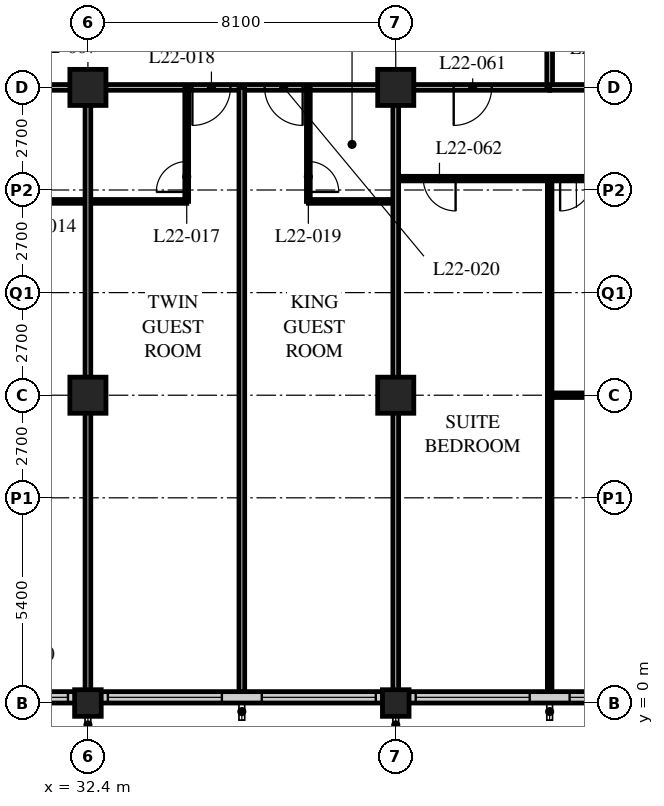
"""IFC4 building model, lengths in metres.
Left out: names, types, materials, properties, quantities, classifications, styles, units other than length and angle.
Written with IfcOpenShell. Run it as: python <this file> out.ifc"""

import sys

from ifc_helpers import new_model, si_unit, direction, frame, frame_2d, origin, origin_2d, place, context, subcontext, project, spatial, rectangle, hollow_rectangle, extrude, element, fill, save


model = new_model("IFC4")
c1 = context("Model", 3, precision=1e-05, world=origin(), true_north=direction((0.0, 1.0)))
c2 = subcontext(c1, "Body", "Model", "MODEL_VIEW")
j1 = project(units=[si_unit("LENGTHUNIT", "METRE"), si_unit("PLANEANGLEUNIT", "RADIAN")], contexts=[c1])
p1 = place(None, origin())
s1 = spatial("IfcSite", under=j1, at=p1, CompositionType="ELEMENT")
p2 = place(p1, origin())
s2 = spatial("IfcBuilding", under=s1, at=p2, CompositionType="ELEMENT")
p3 = place(p2, frame((0.0, 0.0, 87.4)))
s3 = spatial("IfcBuildingStorey", under=s2, at=p3, CompositionType="ELEMENT", Elevation=87.4)
p4 = place(p3, frame((32.4, 0.0, 0.0), z_axis=(0.0, 0.0, 1.0), x_axis=(1.0, 0.0, 0.0)))
e1 = element("IfcColumn", 1, at=p4, inside=s3, PredefinedType="COLUMN", context=c2, shape_type="SweptSolid", body=[
    extrude(hollow_rectangle(XDim=0.7, YDim=0.7, WallThickness=0.06, at=origin_2d()), origin(), (0.0, 0.0, 1.0), 3.4),
])
for number, where, z_axis, x_axis in (
    (2, (32.4, 8.1, 0.0), (0.0, 0.0, 1.0), (1.0, 0.0, 0.0)),
    (3, (32.4, 16.2, 0.0), (0.0, 0.0, 1.0), (1.0, 0.0, 0.0)),
):
    element("IfcColumn", number, at=place(p3, frame(where, z_axis=z_axis, x_axis=x_axis)), inside=s3, PredefinedType="COLUMN", context=c2, shape_type="SweptSolid", body=[
        extrude(hollow_rectangle(XDim=0.95, YDim=0.95, WallThickness=0.095, at=origin_2d()), origin(), (0.0, 0.0, 1.0), 3.4),
    ])
p5 = place(p3, frame((40.5, 0.0, 0.0), z_axis=(0.0, 0.0, 1.0), x_axis=(1.0, 0.0, 0.0)))
e4 = element("IfcColumn", 4, at=p5, inside=s3, PredefinedType="COLUMN", context=c2, shape_type="SweptSolid", body=[
    extrude(hollow_rectangle(XDim=0.7, YDim=0.7, WallThickness=0.06, at=origin_2d()), origin(), (0.0, 0.0, 1.0), 3.4),
])
for number, where, z_axis, x_axis in (
    (5, (40.5, 8.1, 0.0), (0.0, 0.0, 1.0), (1.0, 0.0, 0.0)),
    (6, (40.5, 16.2, 0.0), (0.0, 0.0, 1.0), (1.0, 0.0, 0.0)),
):
    element("IfcColumn", number, at=place(p3, frame(where, z_axis=z_axis, x_axis=x_axis)), inside=s3, PredefinedType="COLUMN", context=c2, shape_type="SweptSolid", body=[
        extrude(hollow_rectangle(XDim=0.95, YDim=0.95, WallThickness=0.095, at=origin_2d()), origin(), (0.0, 0.0, 1.0), 3.4),
    ])
p6 = place(p3, frame((8.4, 0.15, 0.0), z_axis=(0.0, 0.0, 1.0), x_axis=(1.0, 0.0, 0.0)))
e7 = element("IfcWall", 7, at=p6, inside=s3, PredefinedType="SOLIDWALL", context=c2, shape_type="SweptSolid", body=[
    extrude(rectangle(XDim=40.2, YDim=0.3, at=frame_2d((20.1, 0.0))), origin(), (0.0, 0.0, 1.0), 2.05),
])
p7 = place(p6, frame((0.225, 0.0, 0.9)))
e8 = element("IfcOpeningElement", 8, at=p7, cuts=e7, PredefinedType="OPENING", context=c2, shape_type="SweptSolid", body=[
    extrude(rectangle(XDim=3.0, YDim=1.1, at=frame_2d((1.5, 0.55))), frame((0.0, 0.16, 0.0), z_axis=(0.0, -1.0, 0.0), x_axis=(1.0, 0.0, 0.0)), (0.0, 0.0, 1.0), 0.32),
])
p8 = place(p6, frame((4.275, 0.0, 0.9)))
e9 = element("IfcOpeningElement", 9, at=p8, cuts=e7, PredefinedType="OPENING", context=c2, shape_type="SweptSolid", body=[
    extrude(rectangle(XDim=3.0, YDim=1.1, at=frame_2d((1.5, 0.55))), frame((0.0, 0.16, 0.0), z_axis=(0.0, -1.0, 0.0), x_axis=(1.0, 0.0, 0.0)), (0.0, 0.0, 1.0), 0.32),
])
p9 = place(p6, frame((8.325, 0.0, 0.9)))
e10 = element("IfcOpeningElement", 10, at=p9, cuts=e7, PredefinedType="OPENING", context=c2, shape_type="SweptSolid", body=[
    extrude(rectangle(XDim=3.0, YDim=1.1, at=frame_2d((1.5, 0.55))), frame((0.0, 0.16, 0.0), z_axis=(0.0, -1.0, 0.0), x_axis=(1.0, 0.0, 0.0)), (0.0, 0.0, 1.0), 0.32),
])
p10 = place(p6, frame((12.375, 0.0, 0.9)))
e11 = element("IfcOpeningElement", 11, at=p10, cuts=e7, PredefinedType="OPENING", context=c2, shape_type="SweptSolid", body=[
    extrude(rectangle(XDim=3.0, YDim=1.1, at=frame_2d((1.5, 0.55))), frame((0.0, 0.16, 0.0), z_axis=(0.0, -1.0, 0.0), x_axis=(1.0, 0.0, 0.0)), (0.0, 0.0, 1.0), 0.32),
])
p11 = place(p6, frame((16.425, 0.0, 0.9)))
e12 = element("IfcOpeningElement", 12, at=p11, cuts=e7, PredefinedType="OPENING", context=c2, shape_type="SweptSolid", body=[
    extrude(rectangle(XDim=3.0, YDim=1.1, at=frame_2d((1.5, 0.55))), frame((0.0, 0.16, 0.0), z_axis=(0.0, -1.0, 0.0), x_axis=(1.0, 0.0, 0.0)), (0.0, 0.0, 1.0), 0.32),
])
p12 = place(p6, frame((20.475, 0.0, 0.9)))
e13 = element("IfcOpeningElement", 13, at=p12, cuts=e7, PredefinedType="OPENING", context=c2, shape_type="SweptSolid", body=[
    extrude(rectangle(XDim=3.0, YDim=1.1, at=frame_2d((1.5, 0.55))), frame((0.0, 0.16, 0.0), z_axis=(0.0, -1.0, 0.0), x_axis=(1.0, 0.0, 0.0)), (0.0, 0.0, 1.0), 0.32),
])
p13 = place(p6, frame((24.525, 0.0, 0.9)))
e14 = element("IfcOpeningElement", 14, at=p13, cuts=e7, PredefinedType="OPENING", context=c2, shape_type="SweptSolid", body=[
    extrude(rectangle(XDim=3.0, YDim=1.1, at=frame_2d((1.5, 0.55))), frame((0.0, 0.16, 0.0), z_axis=(0.0, -1.0, 0.0), x_axis=(1.0, 0.0, 0.0)), (0.0, 0.0, 1.0), 0.32),
])
p14 = place(p6, frame((28.575, 0.0, 0.9)))
e15 = element("IfcOpeningElement", 15, at=p14, cuts=e7, PredefinedType="OPENING", context=c2, shape_type="SweptSolid", body=[
    extrude(rectangle(XDim=3.0, YDim=1.1, at=frame_2d((1.5, 0.55))), frame((0.0, 0.16, 0.0), z_axis=(0.0, -1.0, 0.0), x_axis=(1.0, 0.0, 0.0)), (0.0, 0.0, 1.0), 0.32),
])
p15 = place(p6, frame((32.625, 0.0, 0.9)))
e16 = element("IfcOpeningElement", 16, at=p15, cuts=e7, PredefinedType="OPENING", context=c2, shape_type="SweptSolid", body=[
    extrude(rectangle(XDim=3.0, YDim=1.1, at=frame_2d((1.5, 0.55))), frame((0.0, 0.16, 0.0), z_axis=(0.0, -1.0, 0.0), x_axis=(1.0, 0.0, 0.0)), (0.0, 0.0, 1.0), 0.32),
])
p16 = place(p6, frame((36.675, 0.0, 0.9)))
e17 = element("IfcOpeningElement", 17, at=p16, cuts=e7, PredefinedType="OPENING", context=c2, shape_type="SweptSolid", body=[
    extrude(rectangle(XDim=3.0, YDim=1.1, at=frame_2d((1.5, 0.55))), frame((0.0, 0.16, 0.0), z_axis=(0.0, -1.0, 0.0), x_axis=(1.0, 0.0, 0.0)), (0.0, 0.0, 1.0), 0.32),
])
p17 = place(p3, frame((12.15, 16.2, 0.0), z_axis=(0.0, 0.0, 1.0), x_axis=(1.0, 0.0, 0.0)))
e18 = element("IfcWall", 18, at=p17, inside=s3, PredefinedType="PARTITIONING", context=c2, shape_type="SweptSolid", body=[
    extrude(rectangle(XDim=32.4, YDim=0.15, at=frame_2d((16.2, 0.0))), origin(), (0.0, 0.0, 1.0), 2.388),
])
p18 = place(p17, frame((6.5, 0.0, 0.0)))
e19 = element("IfcOpeningElement", 19, at=p18, cuts=e18, PredefinedType="OPENING", context=c2, shape_type="SweptSolid", body=[
    extrude(rectangle(XDim=1.0, YDim=2.1, at=frame_2d((0.5, 1.05))), frame((0.0, 0.085, 0.0), z_axis=(0.0, -1.0, 0.0), x_axis=(1.0, 0.0, 0.0)), (0.0, 0.0, 1.0), 0.17),
])
p19 = place(p17, frame((8.4, 0.0, 0.0)))
e20 = element("IfcOpeningElement", 20, at=p19, cuts=e18, PredefinedType="OPENING", context=c2, shape_type="SweptSolid", body=[
    extrude(rectangle(XDim=1.0, YDim=2.1, at=frame_2d((0.5, 1.05))), frame((0.0, 0.085, 0.0), z_axis=(0.0, -1.0, 0.0), x_axis=(1.0, 0.0, 0.0)), (0.0, 0.0, 1.0), 0.17),
])
p20 = place(p17, frame((14.9, 0.0, 0.0)))
e21 = element("IfcOpeningElement", 21, at=p20, cuts=e18, PredefinedType="OPENING", context=c2, shape_type="SweptSolid", body=[
    extrude(rectangle(XDim=1.0, YDim=2.1, at=frame_2d((0.5, 1.05))), frame((0.0, 0.085, 0.0), z_axis=(0.0, -1.0, 0.0), x_axis=(1.0, 0.0, 0.0)), (0.0, 0.0, 1.0), 0.17),
])
p21 = place(p17, frame((16.5, 0.0, 0.0)))
e22 = element("IfcOpeningElement", 22, at=p21, cuts=e18, PredefinedType="OPENING", context=c2, shape_type="SweptSolid", body=[
    extrude(rectangle(XDim=1.0, YDim=2.1, at=frame_2d((0.5, 1.05))), frame((0.0, 0.085, 0.0), z_axis=(0.0, -1.0, 0.0), x_axis=(1.0, 0.0, 0.0)), (0.0, 0.0, 1.0), 0.17),
])
p22 = place(p17, frame((23.0, 0.0, 0.0)))
e23 = element("IfcOpeningElement", 23, at=p22, cuts=e18, PredefinedType="OPENING", context=c2, shape_type="SweptSolid", body=[
    extrude(rectangle(XDim=1.0, YDim=2.1, at=frame_2d((0.5, 1.05))), frame((0.0, 0.085, 0.0), z_axis=(0.0, -1.0, 0.0), x_axis=(1.0, 0.0, 0.0)), (0.0, 0.0, 1.0), 0.17),
])
p23 = place(p17, frame((24.9, 0.0, 0.0)))
e24 = element("IfcOpeningElement", 24, at=p23, cuts=e18, PredefinedType="OPENING", context=c2, shape_type="SweptSolid", body=[
    extrude(rectangle(XDim=1.0, YDim=2.1, at=frame_2d((0.5, 1.05))), frame((0.0, 0.085, 0.0), z_axis=(0.0, -1.0, 0.0), x_axis=(1.0, 0.0, 0.0)), (0.0, 0.0, 1.0), 0.17),
])
p24 = place(p17, frame((1.525, 0.0, 0.0)))
e25 = element("IfcOpeningElement", 25, at=p24, cuts=e18, PredefinedType="OPENING", context=c2, shape_type="SweptSolid", body=[
    extrude(rectangle(XDim=1.0, YDim=2.1, at=frame_2d((0.5, 1.05))), frame((0.0, 0.085, 0.0), z_axis=(0.0, -1.0, 0.0), x_axis=(1.0, 0.0, 0.0)), (0.0, 0.0, 1.0), 0.17),
])
p25 = place(p17, frame((29.875, 0.0, 0.0)))
e26 = element("IfcOpeningElement", 26, at=p25, cuts=e18, PredefinedType="OPENING", context=c2, shape_type="SweptSolid", body=[
    extrude(rectangle(XDim=1.0, YDim=2.1, at=frame_2d((0.5, 1.05))), frame((0.0, 0.085, 0.0), z_axis=(0.0, -1.0, 0.0), x_axis=(1.0, 0.0, 0.0)), (0.0, 0.0, 1.0), 0.17),
])
p26 = place(p3, frame((44.55, 16.2, 0.0), z_axis=(0.0, 0.0, 1.0), x_axis=(0.0, 1.0, 0.0)))
e27 = element("IfcWall", 27, at=p26, inside=s3, PredefinedType="PARTITIONING", context=c2, shape_type="SweptSolid", body=[
    extrude(rectangle(XDim=26.1, YDim=0.15, at=frame_2d((13.05, 0.0))), origin(), (0.0, 0.0, 1.0), 3.15),
])
p27 = place(p26, frame((2.75, 0.0, 0.0)))
e28 = element("IfcOpeningElement", 28, at=p27, cuts=e27, PredefinedType="OPENING", context=c2, shape_type="SweptSolid", body=[
    extrude(rectangle(XDim=1.0, YDim=2.1, at=frame_2d((0.5, 1.05))), frame((0.0, 0.085, 0.0), z_axis=(0.0, -1.0, 0.0), x_axis=(1.0, 0.0, 0.0)), (0.0, 0.0, 1.0), 0.17),
])
p28 = place(p26, frame((6.5, 0.0, 0.0)))
e29 = element("IfcOpeningElement", 29, at=p28, cuts=e27, PredefinedType="OPENING", context=c2, shape_type="SweptSolid", body=[
    extrude(rectangle(XDim=1.0, YDim=2.1, at=frame_2d((0.5, 1.05))), frame((0.0, 0.085, 0.0), z_axis=(0.0, -1.0, 0.0), x_axis=(1.0, 0.0, 0.0)), (0.0, 0.0, 1.0), 0.17),
])
p29 = place(p26, frame((10.0, 0.0, 0.0)))
e30 = element("IfcOpeningElement", 30, at=p29, cuts=e27, PredefinedType="OPENING", context=c2, shape_type="SweptSolid", body=[
    extrude(rectangle(XDim=1.0, YDim=2.1, at=frame_2d((0.5, 1.05))), frame((0.0, 0.085, 0.0), z_axis=(0.0, -1.0, 0.0), x_axis=(1.0, 0.0, 0.0)), (0.0, 0.0, 1.0), 0.17),
])
p30 = place(p26, frame((18.1, 0.0, 0.0)))
e31 = element("IfcOpeningElement", 31, at=p30, cuts=e27, PredefinedType="OPENING", context=c2, shape_type="SweptSolid", body=[
    extrude(rectangle(XDim=1.0, YDim=2.1, at=frame_2d((0.5, 1.05))), frame((0.0, 0.085, 0.0), z_axis=(0.0, -1.0, 0.0), x_axis=(1.0, 0.0, 0.0)), (0.0, 0.0, 1.0), 0.17),
])
p31 = place(p3, frame((29.8, 13.2, 0.0), z_axis=(0.0, 0.0, 1.0), x_axis=(1.0, 0.0, 0.0)))
e32 = element("IfcWall", 32, at=p31, inside=s3, PredefinedType="PARTITIONING", context=c2, shape_type="SweptSolid", body=[
    extrude(rectangle(XDim=5.2, YDim=0.1, at=frame_2d((2.6, 0.0))), origin(), (0.0, 0.0, 1.0), 3.15),
])
p32 = place(p3, frame((32.4, 16.2, 0.0), z_axis=(0.0, 0.0, 1.0), x_axis=(0.0, -1.0, 0.0)))
e33 = element("IfcWall", 33, at=p32, inside=s3, PredefinedType="PARTITIONING", context=c2, shape_type="SweptSolid", body=[
    extrude(rectangle(XDim=15.9, YDim=0.15, at=frame_2d((7.95, 0.0))), origin(), (0.0, 0.0, 1.0), 2.05),
])
p33 = place(p3, frame((35.0, 16.2, 0.0), z_axis=(0.0, 0.0, 1.0), x_axis=(0.0, -1.0, 0.0)))
e34 = element("IfcWall", 34, at=p33, inside=s3, PredefinedType="PARTITIONING", context=c2, shape_type="SweptSolid", body=[
    extrude(rectangle(XDim=3.0, YDim=0.1, at=frame_2d((1.5, 0.0))), origin(), (0.0, 0.0, 1.0), 3.15),
])
p34 = place(p33, frame((1.95, 0.0, 0.0)))
e35 = element("IfcOpeningElement", 35, at=p34, cuts=e34, PredefinedType="OPENING", context=c2, shape_type="SweptSolid", body=[
    extrude(rectangle(XDim=0.8, YDim=2.1, at=frame_2d((0.4, 1.05))), frame((0.0, 0.06, 0.0), z_axis=(0.0, -1.0, 0.0), x_axis=(1.0, 0.0, 0.0)), (0.0, 0.0, 1.0), 0.12),
])
p35 = place(p3, frame((36.45, 16.2, 0.0), z_axis=(0.0, 0.0, 1.0), x_axis=(0.0, -1.0, 0.0)))
e36 = element("IfcWall", 36, at=p35, inside=s3, PredefinedType="PARTITIONING", context=c2, shape_type="SweptSolid", body=[
    extrude(rectangle(XDim=15.9, YDim=0.15, at=frame_2d((7.95, 0.0))), origin(), (0.0, 0.0, 1.0), 3.15),
])
p36 = place(p3, frame((38.2, 13.2, 0.0), z_axis=(0.0, 0.0, 1.0), x_axis=(1.0, 0.0, 0.0)))
e37 = element("IfcWall", 37, at=p36, inside=s3, PredefinedType="PARTITIONING", context=c2, shape_type="SweptSolid", body=[
    extrude(rectangle(XDim=2.3, YDim=0.1, at=frame_2d((1.15, 0.0))), origin(), (0.0, 0.0, 1.0), 3.15),
])
p37 = place(p3, frame((38.2, 16.2, 0.0), z_axis=(0.0, 0.0, 1.0), x_axis=(0.0, -1.0, 0.0)))
e38 = element("IfcWall", 38, at=p37, inside=s3, PredefinedType="PARTITIONING", context=c2, shape_type="SweptSolid", body=[
    extrude(rectangle(XDim=3.0, YDim=0.1, at=frame_2d((1.5, 0.0))), origin(), (0.0, 0.0, 1.0), 3.15),
])
p38 = place(p37, frame((1.95, 0.0, 0.0)))
e39 = element("IfcOpeningElement", 39, at=p38, cuts=e38, PredefinedType="OPENING", context=c2, shape_type="SweptSolid", body=[
    extrude(rectangle(XDim=0.8, YDim=2.1, at=frame_2d((0.4, 1.05))), frame((0.0, 0.06, 0.0), z_axis=(0.0, -1.0, 0.0), x_axis=(1.0, 0.0, 0.0)), (0.0, 0.0, 1.0), 0.12),
])
p39 = place(p3, frame((40.5, 13.8, 0.0), z_axis=(0.0, 0.0, 1.0), x_axis=(1.0, 0.0, 0.0)))
e40 = element("IfcWall", 40, at=p39, inside=s3, PredefinedType="PARTITIONING", context=c2, shape_type="SweptSolid", body=[
    extrude(rectangle(XDim=8.05, YDim=0.12, at=frame_2d((4.025, 0.0))), origin(), (0.0, 0.0, 1.0), 3.15),
])
p40 = place(p39, frame((0.725, 0.0, 0.0)))
e41 = element("IfcOpeningElement", 41, at=p40, cuts=e40, PredefinedType="OPENING", context=c2, shape_type="SweptSolid", body=[
    extrude(rectangle(XDim=0.85, YDim=2.1, at=frame_2d((0.425, 1.05))), frame((0.0, 0.07, 0.0), z_axis=(0.0, -1.0, 0.0), x_axis=(1.0, 0.0, 0.0)), (0.0, 0.0, 1.0), 0.14),
])
p41 = place(p39, frame((4.325, 0.0, 0.0)))
e42 = element("IfcOpeningElement", 42, at=p41, cuts=e40, PredefinedType="OPENING", context=c2, shape_type="SweptSolid", body=[
    extrude(rectangle(XDim=0.85, YDim=2.1, at=frame_2d((0.425, 1.05))), frame((0.0, 0.07, 0.0), z_axis=(0.0, -1.0, 0.0), x_axis=(1.0, 0.0, 0.0)), (0.0, 0.0, 1.0), 0.14),
])
p42 = place(p3, frame((44.55, 13.8, 0.0), z_axis=(0.0, 0.0, 1.0), x_axis=(0.0, -1.0, 0.0)))
e43 = element("IfcWall", 43, at=p42, inside=s3, PredefinedType="PARTITIONING", context=c2, shape_type="SweptSolid", body=[
    extrude(rectangle(XDim=13.5, YDim=0.12, at=frame_2d((6.75, 0.0))), origin(), (0.0, 0.0, 1.0), 3.15),
])
p43 = place(p3, frame((44.55, 16.2, 0.0), z_axis=(0.0, 0.0, 1.0), x_axis=(1.0, 0.0, 0.0)))
e44 = element("IfcWall", 44, at=p43, inside=s3, PredefinedType="PARTITIONING", context=c2, shape_type="SweptSolid", body=[
    extrude(rectangle(XDim=11.85, YDim=0.15, at=frame_2d((5.925, 0.0))), origin(), (0.0, 0.0, 1.0), 2.388),
])
p44 = place(p3, frame((40.5, 16.2, 0.0), z_axis=(0.0, 0.0, 1.0), x_axis=(0.0, -1.0, 0.0)))
e45 = element("IfcWall", 45, at=p44, inside=s3, PredefinedType="PARTITIONING", context=c2, shape_type="SweptSolid", body=[
    extrude(rectangle(XDim=15.9, YDim=0.15, at=frame_2d((7.95, 0.0))), origin(), (0.0, 0.0, 1.0), 2.05),
])
p45 = place(p3, frame((44.55, 8.1, 0.0), z_axis=(0.0, 0.0, 1.0), x_axis=(1.0, 0.0, 0.0)))
e46 = element("IfcWall", 46, at=p45, inside=s3, PredefinedType="PARTITIONING", context=c2, shape_type="SweptSolid", body=[
    extrude(rectangle(XDim=3.575, YDim=0.12, at=frame_2d((1.788, 0.0))), origin(), (0.0, 0.0, 1.0), 2.388),
])
p46 = place(p12, origin())
e47 = element("IfcWindow", 47, at=p46, inside=s3, PartitioningType="SINGLE_PANEL", PredefinedType="WINDOW", context=c2, shape_type="SweptSolid", body=[
    extrude(rectangle(XDim=3.0, YDim=1.1, at=frame_2d((1.5, 0.55))), frame((0.0, 0.03, 0.0), z_axis=(0.0, -1.0, 0.0), x_axis=(1.0, 0.0, 0.0)), (0.0, 0.0, 1.0), 0.06),
])
fill(e13, e47)
p47 = place(p13, origin())
e48 = element("IfcWindow", 48, at=p47, inside=s3, PartitioningType="SINGLE_PANEL", PredefinedType="WINDOW", context=c2, shape_type="SweptSolid", body=[
    extrude(rectangle(XDim=3.0, YDim=1.1, at=frame_2d((1.5, 0.55))), frame((0.0, 0.03, 0.0), z_axis=(0.0, -1.0, 0.0), x_axis=(1.0, 0.0, 0.0)), (0.0, 0.0, 1.0), 0.06),
])
fill(e14, e48)
p48 = place(p14, origin())
e49 = element("IfcWindow", 49, at=p48, inside=s3, PartitioningType="SINGLE_PANEL", PredefinedType="WINDOW", context=c2, shape_type="SweptSolid", body=[
    extrude(rectangle(XDim=3.0, YDim=1.1, at=frame_2d((1.5, 0.55))), frame((0.0, 0.03, 0.0), z_axis=(0.0, -1.0, 0.0), x_axis=(1.0, 0.0, 0.0)), (0.0, 0.0, 1.0), 0.06),
])
fill(e15, e49)
p49 = place(p15, origin())
e50 = element("IfcWindow", 50, at=p49, inside=s3, PartitioningType="SINGLE_PANEL", PredefinedType="WINDOW", context=c2, shape_type="SweptSolid", body=[
    extrude(rectangle(XDim=3.0, YDim=1.1, at=frame_2d((1.5, 0.55))), frame((0.0, 0.03, 0.0), z_axis=(0.0, -1.0, 0.0), x_axis=(1.0, 0.0, 0.0)), (0.0, 0.0, 1.0), 0.06),
])
fill(e16, e50)
p50 = place(p16, origin())
e51 = element("IfcWindow", 51, at=p50, inside=s3, PartitioningType="SINGLE_PANEL", PredefinedType="WINDOW", context=c2, shape_type="SweptSolid", body=[
    extrude(rectangle(XDim=3.0, YDim=1.1, at=frame_2d((1.5, 0.55))), frame((0.0, 0.03, 0.0), z_axis=(0.0, -1.0, 0.0), x_axis=(1.0, 0.0, 0.0)), (0.0, 0.0, 1.0), 0.06),
])
fill(e17, e51)
p51 = place(p34, origin())
e52 = element("IfcDoor", 52, at=p51, inside=s3, OperationType="SINGLE_SWING_LEFT", PredefinedType="DOOR", context=c2, shape_type="SweptSolid", body=[
    extrude(rectangle(XDim=0.8, YDim=2.1, at=frame_2d((0.4, 1.05))), frame((0.0, 0.025, 0.0), z_axis=(0.0, -1.0, 0.0), x_axis=(1.0, 0.0, 0.0)), (0.0, 0.0, 1.0), 0.05),
])
fill(e35, e52)
p52 = place(p22, origin())
e53 = element("IfcDoor", 53, at=p52, inside=s3, OperationType="SINGLE_SWING_RIGHT", PredefinedType="DOOR", context=c2, shape_type="SweptSolid", body=[
    extrude(rectangle(XDim=1.0, YDim=2.1, at=frame_2d((0.5, 1.05))), frame((0.0, 0.025, 0.0), z_axis=(0.0, -1.0, 0.0), x_axis=(1.0, 0.0, 0.0)), (0.0, 0.0, 1.0), 0.05),
])
fill(e23, e53)
p53 = place(p38, origin())
e54 = element("IfcDoor", 54, at=p53, inside=s3, OperationType="SINGLE_SWING_RIGHT", PredefinedType="DOOR", context=c2, shape_type="SweptSolid", body=[
    extrude(rectangle(XDim=0.8, YDim=2.1, at=frame_2d((0.4, 1.05))), frame((0.0, 0.025, 0.0), z_axis=(0.0, -1.0, 0.0), x_axis=(1.0, 0.0, 0.0)), (0.0, 0.0, 1.0), 0.05),
])
fill(e39, e54)
p54 = place(p23, origin())
e55 = element("IfcDoor", 55, at=p54, inside=s3, OperationType="SINGLE_SWING_LEFT", PredefinedType="DOOR", context=c2, shape_type="SweptSolid", body=[
    extrude(rectangle(XDim=1.0, YDim=2.1, at=frame_2d((0.5, 1.05))), frame((0.0, 0.025, 0.0), z_axis=(0.0, -1.0, 0.0), x_axis=(1.0, 0.0, 0.0)), (0.0, 0.0, 1.0), 0.05),
])
fill(e24, e55)
p55 = place(p25, origin())
e56 = element("IfcDoor", 56, at=p55, inside=s3, OperationType="SINGLE_SWING_RIGHT", PredefinedType="DOOR", context=c2, shape_type="SweptSolid", body=[
    extrude(rectangle(XDim=1.0, YDim=2.1, at=frame_2d((0.5, 1.05))), frame((0.0, 0.025, 0.0), z_axis=(0.0, -1.0, 0.0), x_axis=(1.0, 0.0, 0.0)), (0.0, 0.0, 1.0), 0.05),
])
fill(e26, e56)
p56 = place(p40, origin())
e57 = element("IfcDoor", 57, at=p56, inside=s3, OperationType="SINGLE_SWING_LEFT", PredefinedType="DOOR", context=c2, shape_type="SweptSolid", body=[
    extrude(rectangle(XDim=0.85, YDim=2.1, at=frame_2d((0.425, 1.05))), frame((0.0, 0.025, 0.0), z_axis=(0.0, -1.0, 0.0), x_axis=(1.0, 0.0, 0.0)), (0.0, 0.0, 1.0), 0.05),
])
fill(e41, e57)
p57 = place(p41, origin())
e58 = element("IfcDoor", 58, at=p57, inside=s3, OperationType="SINGLE_SWING_RIGHT", PredefinedType="DOOR", context=c2, shape_type="SweptSolid", body=[
    extrude(rectangle(XDim=0.85, YDim=2.1, at=frame_2d((0.425, 1.05))), frame((0.0, 0.025, 0.0), z_axis=(0.0, -1.0, 0.0), x_axis=(1.0, 0.0, 0.0)), (0.0, 0.0, 1.0), 0.05),
])
fill(e42, e58)
save(model, sys.argv[1])
